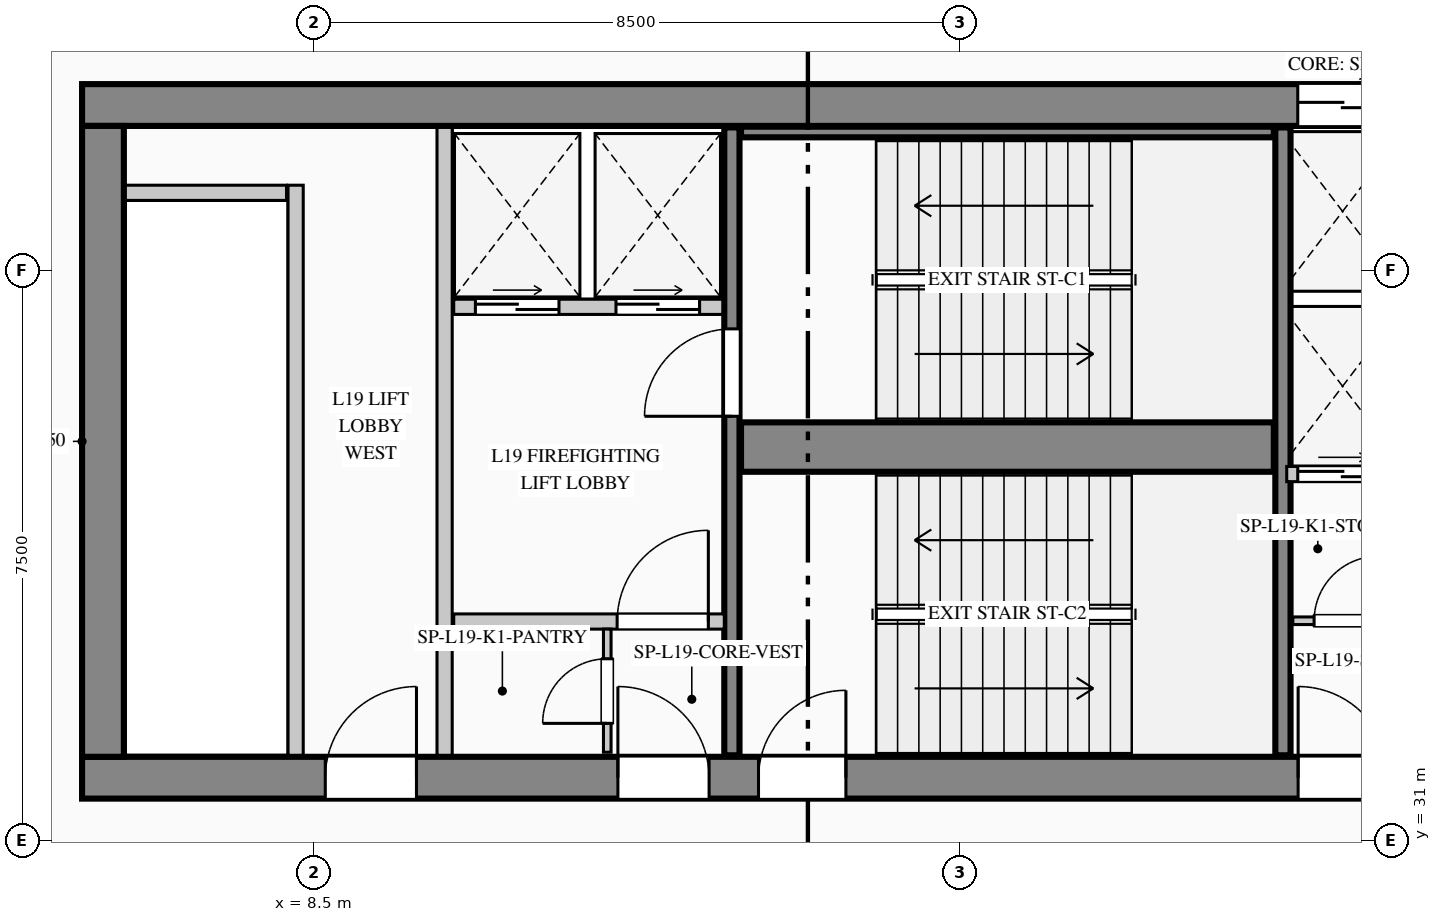
"""IFC4 building model, lengths in metres.
Left out: names, types, materials, properties, quantities, classifications, styles, units other than length and angle.
Written with IfcOpenShell. Run it as: python <this file> out.ifc"""

import sys

from ifc_helpers import new_model, si_unit, direction, frame, frame_2d, origin, place, context, subcontext, project, spatial, rectangle, extrude, element, fill, save


model = new_model("IFC4")
c1 = context("Model", 3, precision=1e-05, world=origin(), true_north=direction((0.0, 1.0)))
c2 = subcontext(c1, "Body", "Model", "MODEL_VIEW")
j1 = project(units=[si_unit("LENGTHUNIT", "METRE"), si_unit("PLANEANGLEUNIT", "RADIAN")], contexts=[c1])
p1 = place(None, origin())
s1 = spatial("IfcSite", under=j1, at=p1, CompositionType="ELEMENT")
p2 = place(p1, origin())
s2 = spatial("IfcBuilding", under=s1, at=p2, CompositionType="ELEMENT")
p3 = place(p2, frame((0.0, 0.0, 84.2)))
s3 = spatial("IfcBuildingStorey", under=s2, at=p3, CompositionType="ELEMENT", Elevation=84.2)
p4 = place(p3, frame((5.45, 40.675, 0.0), z_axis=(0.0, 0.0, 1.0), x_axis=(1.0, 0.0, 0.0)))
e1 = element("IfcWall", 1, at=p4, inside=s3, PredefinedType="SHEAR", context=c2, shape_type="SweptSolid", body=[
    extrude(rectangle(XDim=17.95, YDim=0.55, at=frame_2d((8.975, 0.0))), origin(), (0.0, 0.0, 1.0), 4.4),
])
p5 = place(p4, frame((15.995, 0.0, 0.0)))
e2 = element("IfcOpeningElement", 2, at=p5, cuts=e1, PredefinedType="OPENING", context=c2, shape_type="SweptSolid", body=[
    extrude(rectangle(XDim=1.18, YDim=2.25, at=frame_2d((0.59, 1.125))), frame((0.0, 0.285, 0.0), z_axis=(0.0, -1.0, 0.0), x_axis=(1.0, 0.0, 0.0)), (0.0, 0.0, 1.0), 0.57),
])
p6 = place(p3, frame((5.45, 31.825, 0.0), z_axis=(0.0, 0.0, 1.0), x_axis=(1.0, 0.0, 0.0)))
e3 = element("IfcWall", 3, at=p6, inside=s3, PredefinedType="SHEAR", context=c2, shape_type="SweptSolid", body=[
    extrude(rectangle(XDim=17.95, YDim=0.55, at=frame_2d((8.975, 0.0))), origin(), (0.0, 0.0, 1.0), 4.4),
])
p7 = place(p6, frame((3.2, 0.0, 0.0)))
e4 = element("IfcOpeningElement", 4, at=p7, cuts=e3, PredefinedType="OPENING", context=c2, shape_type="SweptSolid", body=[
    extrude(rectangle(XDim=1.2, YDim=2.2, at=frame_2d((0.6, 1.1))), frame((0.0, 0.285, 0.0), z_axis=(0.0, -1.0, 0.0), x_axis=(1.0, 0.0, 0.0)), (0.0, 0.0, 1.0), 0.57),
])
p8 = place(p6, frame((7.05, 0.0, 0.0)))
e5 = element("IfcOpeningElement", 5, at=p8, cuts=e3, PredefinedType="OPENING", context=c2, shape_type="SweptSolid", body=[
    extrude(rectangle(XDim=1.2, YDim=2.2, at=frame_2d((0.6, 1.1))), frame((0.0, 0.285, 0.0), z_axis=(0.0, -1.0, 0.0), x_axis=(1.0, 0.0, 0.0)), (0.0, 0.0, 1.0), 0.57),
])
p9 = place(p6, frame((8.9, 0.0, 0.0)))
e6 = element("IfcOpeningElement", 6, at=p9, cuts=e3, PredefinedType="OPENING", context=c2, shape_type="SweptSolid", body=[
    extrude(rectangle(XDim=1.15, YDim=2.2, at=frame_2d((0.575, 1.1))), frame((0.0, 0.285, 0.0), z_axis=(0.0, -1.0, 0.0), x_axis=(1.0, 0.0, 0.0)), (0.0, 0.0, 1.0), 0.57),
])
p10 = place(p6, frame((16.0, 0.0, 0.0)))
e7 = element("IfcOpeningElement", 7, at=p10, cuts=e3, PredefinedType="OPENING", context=c2, shape_type="SweptSolid", body=[
    extrude(rectangle(XDim=1.2, YDim=2.2, at=frame_2d((0.6, 1.1))), frame((0.0, 0.285, 0.0), z_axis=(0.0, -1.0, 0.0), x_axis=(1.0, 0.0, 0.0)), (0.0, 0.0, 1.0), 0.57),
])
p11 = place(p3, frame((5.725, 32.1, 0.0), z_axis=(0.0, 0.0, 1.0), x_axis=(0.0, 1.0, 0.0)))
e8 = element("IfcWall", 8, at=p11, inside=s3, PredefinedType="SHEAR", context=c2, shape_type="SweptSolid", body=[
    extrude(rectangle(XDim=8.3, YDim=0.55, at=frame_2d((4.15, 0.0))), origin(), (0.0, 0.0, 1.0), 4.4),
])
p12 = place(p3, frame((14.0, 32.12, 0.0), z_axis=(0.0, 0.0, 1.0), x_axis=(0.0, 1.0, 0.0)))
e9 = element("IfcWall", 9, at=p12, inside=s3, PredefinedType="SHEAR", context=c2, shape_type="SweptSolid", body=[
    extrude(rectangle(XDim=8.26, YDim=0.2, at=frame_2d((4.13, 0.0))), origin(), (0.0, 0.0, 1.0), 4.4),
])
p13 = place(p12, frame((4.46, 0.0, 0.0)))
e10 = element("IfcOpeningElement", 10, at=p13, cuts=e9, PredefinedType="OPENING", context=c2, shape_type="SweptSolid", body=[
    extrude(rectangle(XDim=1.15, YDim=2.2, at=frame_2d((0.575, 1.1))), frame((0.0, 0.11, 0.0), z_axis=(0.0, -1.0, 0.0), x_axis=(1.0, 0.0, 0.0)), (0.0, 0.0, 1.0), 0.22),
])
p14 = place(p3, frame((14.12, 36.175, 0.0), z_axis=(0.0, 0.0, 1.0), x_axis=(1.0, 0.0, 0.0)))
e11 = element("IfcWall", 11, at=p14, inside=s3, PredefinedType="SHEAR", context=c2, shape_type="SweptSolid", body=[
    extrude(rectangle(XDim=7.01, YDim=0.65, at=frame_2d((3.505, 0.0))), origin(), (0.0, 0.0, 1.0), 4.4),
])
p15 = place(p3, frame((21.25, 32.12, 0.0), z_axis=(0.0, 0.0, 1.0), x_axis=(0.0, 1.0, 0.0)))
e12 = element("IfcWall", 12, at=p15, inside=s3, PredefinedType="SHEAR", context=c2, shape_type="SweptSolid", body=[
    extrude(rectangle(XDim=8.26, YDim=0.2, at=frame_2d((4.13, 0.0))), origin(), (0.0, 0.0, 1.0), 4.4),
])
p16 = place(p3, frame((14.12, 40.32, 0.0), z_axis=(0.0, 0.0, 1.0), x_axis=(1.0, 0.0, 0.0)))
e13 = element("IfcWall", 13, at=p16, inside=s3, PredefinedType="SHEAR", context=c2, shape_type="SweptSolid", body=[
    extrude(rectangle(XDim=7.01, YDim=0.14, at=frame_2d((3.505, 0.0))), origin(), (0.0, 0.0, 1.0), 4.4),
])
p17 = place(p3, frame((8.523, 4.84, 0.0), z_axis=(0.0, 0.0, 1.0), x_axis=(-0.150394554312, 0.988626055712, 0.0)))
e14 = element("IfcWall", 14, at=p17, inside=s3, PredefinedType="STANDARD", context=c2, shape_type="SweptSolid", body=[
    extrude(rectangle(XDim=36.738, YDim=0.28, at=frame_2d((18.369, 0.0))), origin(), (0.0, 0.0, 1.0), 4.115),
])
p18 = place(p17, frame((22.612, 0.0, 0.9)))
e15 = element("IfcOpeningElement", 15, at=p18, cuts=e14, PredefinedType="OPENING", context=c2, shape_type="SweptSolid", body=[
    extrude(rectangle(XDim=1.8, YDim=2.1, at=frame_2d((0.9, 1.05))), frame((0.0, 0.15, 0.0), z_axis=(0.0, -1.0, 0.0), x_axis=(1.0, 0.0, 0.0)), (0.0, 0.0, 1.0), 0.3),
])
p19 = place(p3, frame((8.26, 32.12, 0.0), z_axis=(0.0, 0.0, 1.0), x_axis=(0.0, 1.0, 0.0)))
e16 = element("IfcWall", 16, at=p19, inside=s3, PredefinedType="PARTITIONING", context=c2, shape_type="SweptSolid", body=[
    extrude(rectangle(XDim=7.5, YDim=0.2, at=frame_2d((3.75, 0.0))), origin(), (0.0, 0.0, 1.0), 4.115),
])
p20 = place(p3, frame((6.02, 39.52, 0.0), z_axis=(0.0, 0.0, 1.0), x_axis=(1.0, 0.0, 0.0)))
e17 = element("IfcWall", 17, at=p20, inside=s3, PredefinedType="PARTITIONING", context=c2, shape_type="SweptSolid", body=[
    extrude(rectangle(XDim=2.12, YDim=0.2, at=frame_2d((1.06, 0.0))), origin(), (0.0, 0.0, 1.0), 4.115),
])
p21 = place(p3, frame((10.22, 32.12, 0.0), z_axis=(0.0, 0.0, 1.0), x_axis=(0.0, 1.0, 0.0)))
e18 = element("IfcWall", 18, at=p21, inside=s3, PredefinedType="PARTITIONING", context=c2, shape_type="SweptSolid", body=[
    extrude(rectangle(XDim=8.26, YDim=0.2, at=frame_2d((4.13, 0.0))), origin(), (0.0, 0.0, 1.0), 4.115),
])
p22 = place(p3, frame((10.34, 38.02, 0.0), z_axis=(0.0, 0.0, 1.0), x_axis=(1.0, 0.0, 0.0)))
e19 = element("IfcWall", 19, at=p22, inside=s3, PredefinedType="PARTITIONING", context=c2, shape_type="SweptSolid", body=[
    extrude(rectangle(XDim=3.54, YDim=0.2, at=frame_2d((1.77, 0.0))), origin(), (0.0, 0.0, 1.0), 4.115),
])
p23 = place(p22, frame((0.285, 0.0, 0.0)))
e20 = element("IfcOpeningElement", 20, at=p23, cuts=e19, PredefinedType="OPENING", context=c2, shape_type="SweptSolid", body=[
    extrude(rectangle(XDim=1.1, YDim=2.2, at=frame_2d((0.55, 1.1))), frame((0.0, 0.11, 0.0), z_axis=(0.0, -1.0, 0.0), x_axis=(1.0, 0.0, 0.0)), (0.0, 0.0, 1.0), 0.22),
])
p24 = place(p22, frame((2.135, 0.0, 0.0)))
e21 = element("IfcOpeningElement", 21, at=p24, cuts=e19, PredefinedType="OPENING", context=c2, shape_type="SweptSolid", body=[
    extrude(rectangle(XDim=1.1, YDim=2.2, at=frame_2d((0.55, 1.1))), frame((0.0, 0.11, 0.0), z_axis=(0.0, -1.0, 0.0), x_axis=(1.0, 0.0, 0.0)), (0.0, 0.0, 1.0), 0.22),
])
p25 = place(p3, frame((10.34, 33.88, 0.0), z_axis=(0.0, 0.0, 1.0), x_axis=(1.0, 0.0, 0.0)))
e22 = element("IfcWall", 22, at=p25, inside=s3, PredefinedType="PARTITIONING", context=c2, shape_type="SweptSolid", body=[
    extrude(rectangle(XDim=3.56, YDim=0.2, at=frame_2d((1.78, 0.0))), origin(), (0.0, 0.0, 1.0), 4.115),
])
p26 = place(p25, frame((2.15, 0.0, 0.0)))
e23 = element("IfcOpeningElement", 23, at=p26, cuts=e22, PredefinedType="OPENING", context=c2, shape_type="SweptSolid", body=[
    extrude(rectangle(XDim=1.2, YDim=2.2, at=frame_2d((0.6, 1.1))), frame((0.0, 0.11, 0.0), z_axis=(0.0, -1.0, 0.0), x_axis=(1.0, 0.0, 0.0)), (0.0, 0.0, 1.0), 0.22),
])
p27 = place(p3, frame((12.36, 32.16, 0.0), z_axis=(0.0, 0.0, 1.0), x_axis=(0.0, 1.0, 0.0)))
e24 = element("IfcWall", 24, at=p27, inside=s3, PredefinedType="PARTITIONING", context=c2, shape_type="SweptSolid", body=[
    extrude(rectangle(XDim=1.62, YDim=0.1, at=frame_2d((0.81, 0.0))), origin(), (0.0, 0.0, 1.0), 4.115),
])
p28 = place(p27, frame((0.38, 0.0, 0.0)))
e25 = element("IfcOpeningElement", 25, at=p28, cuts=e24, PredefinedType="OPENING", context=c2, shape_type="SweptSolid", body=[
    extrude(rectangle(XDim=0.85, YDim=2.1, at=frame_2d((0.425, 1.05))), frame((0.0, 0.06, 0.0), z_axis=(0.0, -1.0, 0.0), x_axis=(1.0, 0.0, 0.0)), (0.0, 0.0, 1.0), 0.12),
])
p29 = place(p3, frame((21.38, 33.89, 0.0), z_axis=(0.0, 0.0, 1.0), x_axis=(1.0, 0.0, 0.0)))
e26 = element("IfcWall", 26, at=p29, inside=s3, PredefinedType="PARTITIONING", context=c2, shape_type="SweptSolid", body=[
    extrude(rectangle(XDim=1.42, YDim=0.1, at=frame_2d((0.71, 0.0))), origin(), (0.0, 0.0, 1.0), 4.115),
])
p30 = place(p29, frame((0.28, 0.0, 0.0)))
e27 = element("IfcOpeningElement", 27, at=p30, cuts=e26, PredefinedType="OPENING", context=c2, shape_type="SweptSolid", body=[
    extrude(rectangle(XDim=0.85, YDim=2.1, at=frame_2d((0.425, 1.05))), frame((0.0, 0.06, 0.0), z_axis=(0.0, -1.0, 0.0), x_axis=(1.0, 0.0, 0.0)), (0.0, 0.0, 1.0), 0.12),
])
p31 = place(p3, frame((21.3, 35.82, 0.0), z_axis=(0.0, 0.0, 1.0), x_axis=(1.0, 0.0, 0.0)))
e28 = element("IfcWall", 28, at=p31, inside=s3, PredefinedType="PARTITIONING", context=c2, shape_type="SweptSolid", body=[
    extrude(rectangle(XDim=1.5, YDim=0.2, at=frame_2d((0.75, 0.0))), origin(), (0.0, 0.0, 1.0), 4.115),
])
p32 = place(p31, frame((0.145, 0.0, 0.0)))
e29 = element("IfcOpeningElement", 29, at=p32, cuts=e28, PredefinedType="OPENING", context=c2, shape_type="SweptSolid", body=[
    extrude(rectangle(XDim=1.18, YDim=2.25, at=frame_2d((0.59, 1.125))), frame((0.0, 0.11, 0.0), z_axis=(0.0, -1.0, 0.0), x_axis=(1.0, 0.0, 0.0)), (0.0, 0.0, 1.0), 0.22),
])
p33 = place(p7, origin())
e30 = element("IfcDoor", 30, at=p33, inside=s3, OperationType="SINGLE_SWING_RIGHT", PredefinedType="DOOR", context=c2, shape_type="SweptSolid", body=[
    extrude(rectangle(XDim=1.2, YDim=2.2, at=frame_2d((0.6, 1.1))), frame((0.0, 0.025, 0.0), z_axis=(0.0, -1.0, 0.0), x_axis=(1.0, 0.0, 0.0)), (0.0, 0.0, 1.0), 0.05),
])
fill(e4, e30)
p34 = place(p8, origin())
e31 = element("IfcDoor", 31, at=p34, inside=s3, OperationType="SINGLE_SWING_LEFT", PredefinedType="DOOR", context=c2, shape_type="SweptSolid", body=[
    extrude(rectangle(XDim=1.2, YDim=2.2, at=frame_2d((0.6, 1.1))), frame((0.0, 0.025, 0.0), z_axis=(0.0, -1.0, 0.0), x_axis=(1.0, 0.0, 0.0)), (0.0, 0.0, 1.0), 0.05),
])
fill(e5, e31)
p35 = place(p9, origin())
e32 = element("IfcDoor", 32, at=p35, inside=s3, OperationType="SINGLE_SWING_RIGHT", PredefinedType="DOOR", context=c2, shape_type="SweptSolid", body=[
    extrude(rectangle(XDim=1.15, YDim=2.2, at=frame_2d((0.575, 1.1))), frame((0.0, 0.025, 0.0), z_axis=(0.0, -1.0, 0.0), x_axis=(1.0, 0.0, 0.0)), (0.0, 0.0, 1.0), 0.05),
])
fill(e6, e32)
p36 = place(p10, origin())
e33 = element("IfcDoor", 33, at=p36, inside=s3, OperationType="SINGLE_SWING_LEFT", PredefinedType="DOOR", context=c2, shape_type="SweptSolid", body=[
    extrude(rectangle(XDim=1.2, YDim=2.2, at=frame_2d((0.6, 1.1))), frame((0.0, 0.025, 0.0), z_axis=(0.0, -1.0, 0.0), x_axis=(1.0, 0.0, 0.0)), (0.0, 0.0, 1.0), 0.05),
])
fill(e7, e33)
p37 = place(p26, origin())
e34 = element("IfcDoor", 34, at=p37, inside=s3, OperationType="SINGLE_SWING_RIGHT", PredefinedType="DOOR", context=c2, shape_type="SweptSolid", body=[
    extrude(rectangle(XDim=1.2, YDim=2.2, at=frame_2d((0.6, 1.1))), frame((0.0, 0.025, 0.0), z_axis=(0.0, -1.0, 0.0), x_axis=(1.0, 0.0, 0.0)), (0.0, 0.0, 1.0), 0.05),
])
fill(e23, e34)
p38 = place(p28, origin())
e35 = element("IfcDoor", 35, at=p38, inside=s3, OperationType="SINGLE_SWING_LEFT", PredefinedType="DOOR", context=c2, shape_type="SweptSolid", body=[
    extrude(rectangle(XDim=0.85, YDim=2.1, at=frame_2d((0.425, 1.05))), frame((0.0, 0.025, 0.0), z_axis=(0.0, -1.0, 0.0), x_axis=(1.0, 0.0, 0.0)), (0.0, 0.0, 1.0), 0.05),
])
fill(e25, e35)
p39 = place(p30, origin())
e36 = element("IfcDoor", 36, at=p39, inside=s3, OperationType="SINGLE_SWING_RIGHT", PredefinedType="DOOR", context=c2, shape_type="SweptSolid", body=[
    extrude(rectangle(XDim=0.85, YDim=2.1, at=frame_2d((0.425, 1.05))), frame((0.0, 0.025, 0.0), z_axis=(0.0, -1.0, 0.0), x_axis=(1.0, 0.0, 0.0)), (0.0, 0.0, 1.0), 0.05),
])
fill(e27, e36)
p40 = place(p13, origin())
e37 = element("IfcDoor", 37, at=p40, inside=s3, OperationType="SINGLE_SWING_LEFT", PredefinedType="DOOR", context=c2, shape_type="SweptSolid", body=[
    extrude(rectangle(XDim=1.15, YDim=2.2, at=frame_2d((0.575, 1.1))), frame((0.0, 0.025, 0.0), z_axis=(0.0, -1.0, 0.0), x_axis=(1.0, 0.0, 0.0)), (0.0, 0.0, 1.0), 0.05),
])
fill(e10, e37)
p41 = place(p23, origin())
e38 = element("IfcDoor", 38, at=p41, inside=s3, OperationType="DOUBLE_DOOR_SLIDING", PredefinedType="DOOR", context=c2, shape_type="SweptSolid", body=[
    extrude(rectangle(XDim=1.1, YDim=2.2, at=frame_2d((0.55, 1.1))), frame((0.0, 0.025, 0.0), z_axis=(0.0, -1.0, 0.0), x_axis=(1.0, 0.0, 0.0)), (0.0, 0.0, 1.0), 0.05),
])
fill(e20, e38)
p42 = place(p24, origin())
e39 = element("IfcDoor", 39, at=p42, inside=s3, OperationType="DOUBLE_DOOR_SLIDING", PredefinedType="DOOR", context=c2, shape_type="SweptSolid", body=[
    extrude(rectangle(XDim=1.1, YDim=2.2, at=frame_2d((0.55, 1.1))), frame((0.0, 0.025, 0.0), z_axis=(0.0, -1.0, 0.0), x_axis=(1.0, 0.0, 0.0)), (0.0, 0.0, 1.0), 0.05),
])
fill(e21, e39)
p43 = place(p5, origin())
e40 = element("IfcDoor", 40, at=p43, inside=s3, OperationType="DOUBLE_DOOR_SLIDING", PredefinedType="DOOR", context=c2, shape_type="SweptSolid", body=[
    extrude(rectangle(XDim=1.18, YDim=2.25, at=frame_2d((0.59, 1.125))), frame((0.0, 0.025, 0.0), z_axis=(0.0, -1.0, 0.0), x_axis=(1.0, 0.0, 0.0)), (0.0, 0.0, 1.0), 0.05),
])
fill(e2, e40)
p44 = place(p32, origin())
e41 = element("IfcDoor", 41, at=p44, inside=s3, OperationType="DOUBLE_DOOR_SLIDING", PredefinedType="DOOR", context=c2, shape_type="SweptSolid", body=[
    extrude(rectangle(XDim=1.18, YDim=2.25, at=frame_2d((0.59, 1.125))), frame((0.0, 0.025, 0.0), z_axis=(0.0, -1.0, 0.0), x_axis=(1.0, 0.0, 0.0)), (0.0, 0.0, 1.0), 0.05),
])
fill(e29, e41)
save(model, sys.argv[1])
